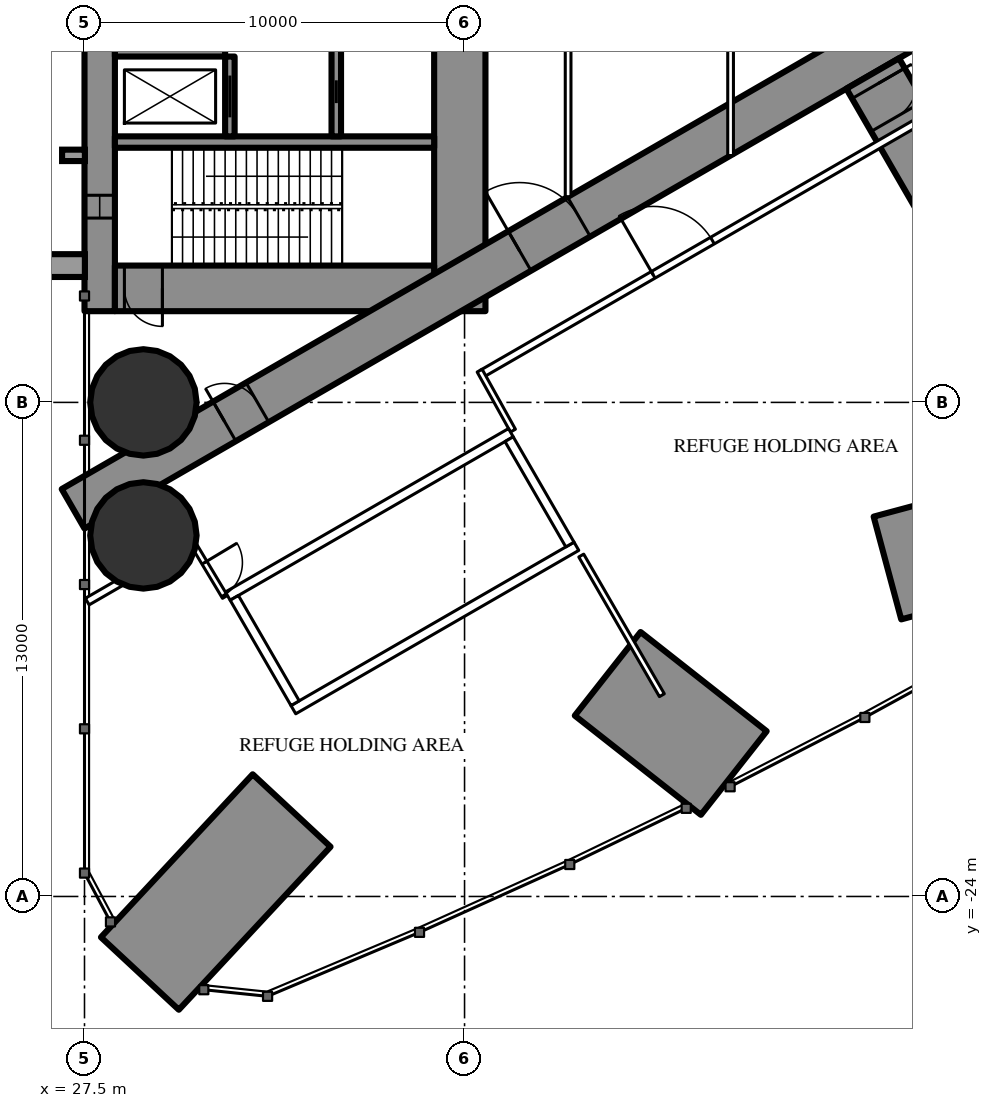
"""IFC4 building model, lengths in metres.
Left out: names, types, materials, properties, quantities, classifications, styles, units other than length and angle.
Written with IfcOpenShell. Run it as: python <this file> out.ifc"""

import sys

from ifc_helpers import new_model, si_unit, direction, frame, frame_2d, origin, origin_2d, place, context, subcontext, project, spatial, rectangle, hollow_circle, extrude, element, fill, save


model = new_model("IFC4")
c1 = context("Model", 3, precision=1e-05, world=origin(), true_north=direction((0.0, 1.0)))
c2 = subcontext(c1, "Body", "Model", "MODEL_VIEW")
j1 = project(units=[si_unit("LENGTHUNIT", "METRE"), si_unit("PLANEANGLEUNIT", "RADIAN")], contexts=[c1])
p1 = place(None, origin())
s1 = spatial("IfcSite", under=j1, at=p1, CompositionType="ELEMENT")
p2 = place(p1, origin())
s2 = spatial("IfcBuilding", under=s1, at=p2, CompositionType="ELEMENT")
p3 = place(p2, frame((0.0, 0.0, 81.0)))
s3 = spatial("IfcBuildingStorey", under=s2, at=p3, CompositionType="ELEMENT", Elevation=81.0)
p4 = place(p3, frame((28.957, -26.027, 0.0), z_axis=(0.0, 0.0, 1.0), x_axis=(0.681428532725, 0.731884659484, 0.0)))
e1 = element("IfcWall", 1, at=p4, inside=s3, PredefinedType="SHEAR", context=c2, shape_type="SweptSolid", body=[
    extrude(rectangle(XDim=5.86, YDim=2.8, at=frame_2d((2.93, 0.0))), origin(), (0.0, 0.0, 1.0), 6.0),
])
for number, where, z_axis, x_axis in (
    (2, (29.05, -11.0, 0.0), (0.0, 0.0, 1.0), (1.0, 0.0, 0.0)),
    (3, (29.05, -14.5, 0.0), (0.0, 0.0, 1.0), (1.0, 0.0, 0.0)),
):
    element("IfcColumn", number, at=place(p3, frame(where, z_axis=z_axis, x_axis=x_axis)), inside=s3, PredefinedType="COLUMN", context=c2, shape_type="SweptSolid", body=[
        extrude(hollow_circle(Radius=1.4, WallThickness=0.12, at=origin_2d()), origin(), (0.0, 0.0, 1.0), 6.0),
    ])
p5 = place(p3, frame((44.584, -20.752, 0.0), z_axis=(0.0, 0.0, 1.0), x_axis=(-0.785936955348, 0.618306640931, 0.0)))
e4 = element("IfcWall", 4, at=p5, inside=s3, PredefinedType="SHEAR", context=c2, shape_type="SweptSolid", body=[
    extrude(rectangle(XDim=4.222, YDim=2.8, at=frame_2d((2.111, 0.0))), origin(), (0.0, 0.0, 1.0), 6.0),
])
p6 = place(p3, frame((56.147, -13.337, 0.0), z_axis=(0.0, 0.0, 1.0), x_axis=(-0.965766047912, -0.259414611578, 0.0)))
e5 = element("IfcWall", 5, at=p6, inside=s3, PredefinedType="SHEAR", context=c2, shape_type="SweptSolid", body=[
    extrude(rectangle(XDim=7.787, YDim=2.8, at=frame_2d((3.894, 0.0))), origin(), (0.0, 0.0, 1.0), 6.0),
])
p7 = place(p3, frame((27.9, -8.6, 0.0), z_axis=(0.0, 0.0, 1.0), x_axis=(0.0, 1.0, 0.0)))
e6 = element("IfcWall", 6, at=p7, inside=s3, PredefinedType="SHEAR", context=c2, shape_type="SweptSolid", body=[
    extrude(rectangle(XDim=17.2, YDim=0.8, at=frame_2d((8.6, 0.0))), origin(), (0.0, 0.0, 1.0), 6.0),
])
p8 = place(p7, frame((2.45, 0.0, 0.6)))
e7 = element("IfcOpeningElement", 7, at=p8, cuts=e6, PredefinedType="OPENING", context=c2, shape_type="SweptSolid", body=[
    extrude(rectangle(XDim=0.6, YDim=4.5, at=frame_2d((0.3, 2.25))), frame((0.0, 0.41, 0.0), z_axis=(0.0, -1.0, 0.0), x_axis=(1.0, 0.0, 0.0)), (0.0, 0.0, 1.0), 0.82),
])
p9 = place(p7, frame((14.15, 0.0, 0.6)))
e8 = element("IfcOpeningElement", 8, at=p9, cuts=e6, PredefinedType="OPENING", context=c2, shape_type="SweptSolid", body=[
    extrude(rectangle(XDim=0.6, YDim=4.5, at=frame_2d((0.3, 2.25))), frame((0.0, 0.41, 0.0), z_axis=(0.0, -1.0, 0.0), x_axis=(1.0, 0.0, 0.0)), (0.0, 0.0, 1.0), 0.82),
])
p10 = place(p3, frame((37.375, -8.6, 0.0), z_axis=(0.0, 0.0, 1.0), x_axis=(0.0, 1.0, 0.0)))
e9 = element("IfcWall", 9, at=p10, inside=s3, PredefinedType="SHEAR", context=c2, shape_type="SweptSolid", body=[
    extrude(rectangle(XDim=17.2, YDim=1.35, at=frame_2d((8.6, 0.0))), origin(), (0.0, 0.0, 1.0), 6.0),
])
p11 = place(p10, frame((7.7, 0.0, 0.0)))
e10 = element("IfcOpeningElement", 10, at=p11, cuts=e9, PredefinedType="OPENING", context=c2, shape_type="SweptSolid", body=[
    extrude(rectangle(XDim=1.8, YDim=2.2, at=frame_2d((0.9, 1.1))), frame((0.0, 0.685, 0.0), z_axis=(0.0, -1.0, 0.0), x_axis=(1.0, 0.0, 0.0)), (0.0, 0.0, 1.0), 1.37),
])
p12 = place(p3, frame((28.3, -8.0, 0.0), z_axis=(0.0, 0.0, 1.0), x_axis=(1.0, 0.0, 0.0)))
e11 = element("IfcWall", 11, at=p12, inside=s3, PredefinedType="SHEAR", context=c2, shape_type="SweptSolid", body=[
    extrude(rectangle(XDim=8.4, YDim=1.2, at=frame_2d((4.2, 0.0))), origin(), (0.0, 0.0, 1.0), 6.0),
])
p13 = place(p12, frame((0.25, 0.0, 0.0)))
e12 = element("IfcOpeningElement", 12, at=p13, cuts=e11, PredefinedType="OPENING", context=c2, shape_type="SweptSolid", body=[
    extrude(rectangle(XDim=1.0, YDim=2.2, at=frame_2d((0.5, 1.1))), frame((0.0, 0.61, 0.0), z_axis=(0.0, -1.0, 0.0), x_axis=(1.0, 0.0, 0.0)), (0.0, 0.0, 1.0), 1.22),
])
p14 = place(p3, frame((28.3, -4.15, 0.0), z_axis=(0.0, 0.0, 1.0), x_axis=(1.0, 0.0, 0.0)))
e13 = element("IfcWall", 13, at=p14, inside=s3, PredefinedType="SHEAR", context=c2, shape_type="SweptSolid", body=[
    extrude(rectangle(XDim=8.4, YDim=0.3, at=frame_2d((4.2, 0.0))), origin(), (0.0, 0.0, 1.0), 6.0),
])
p15 = place(p3, frame((31.325, -4.0, 0.0), z_axis=(0.0, 0.0, 1.0), x_axis=(0.0, 1.0, 0.0)))
e14 = element("IfcWall", 14, at=p15, inside=s3, PredefinedType="SHEAR", context=c2, shape_type="SweptSolid", body=[
    extrude(rectangle(XDim=2.1, YDim=0.25, at=frame_2d((1.05, 0.0))), origin(), (0.0, 0.0, 1.0), 6.0),
])
p16 = place(p15, frame((0.5, 0.0, 0.0)))
e15 = element("IfcOpeningElement", 15, at=p16, cuts=e14, PredefinedType="OPENING", context=c2, shape_type="SweptSolid", body=[
    extrude(rectangle(XDim=1.1, YDim=2.2, at=frame_2d((0.55, 1.1))), frame((0.0, 0.135, 0.0), z_axis=(0.0, -1.0, 0.0), x_axis=(1.0, 0.0, 0.0)), (0.0, 0.0, 1.0), 0.27),
])
p17 = place(p3, frame((34.125, -4.0, 0.0), z_axis=(0.0, 0.0, 1.0), x_axis=(0.0, 1.0, 0.0)))
e16 = element("IfcWall", 16, at=p17, inside=s3, PredefinedType="SHEAR", context=c2, shape_type="SweptSolid", body=[
    extrude(rectangle(XDim=2.35, YDim=0.25, at=frame_2d((1.175, 0.0))), origin(), (0.0, 0.0, 1.0), 6.0),
])
p18 = place(p17, frame((0.875, 0.0, 0.0)))
e17 = element("IfcOpeningElement", 17, at=p18, cuts=e16, PredefinedType="OPENING", context=c2, shape_type="SweptSolid", body=[
    extrude(rectangle(XDim=0.6, YDim=2.0, at=frame_2d((0.3, 1.0))), frame((0.0, 0.135, 0.0), z_axis=(0.0, -1.0, 0.0), x_axis=(1.0, 0.0, 0.0)), (0.0, 0.0, 1.0), 0.27),
])
p19 = place(p3, frame((28.3, -1.775, 0.0), z_axis=(0.0, 0.0, 1.0), x_axis=(1.0, 0.0, 0.0)))
e18 = element("IfcWall", 18, at=p19, inside=s3, PredefinedType="SHEAR", context=c2, shape_type="SweptSolid", body=[
    extrude(rectangle(XDim=2.9, YDim=0.25, at=frame_2d((1.45, 0.0))), origin(), (0.0, 0.0, 1.0), 6.0),
])
p20 = place(p3, frame((27.2, -13.8, 0.0), z_axis=(0.0, 0.0, 1.0), x_axis=(0.866027159892, 0.499996958321, 0.0)))
e19 = element("IfcWall", 19, at=p20, inside=s3, PredefinedType="SHEAR", context=c2, shape_type="SweptSolid", body=[
    extrude(rectangle(XDim=27.947, YDim=1.2, at=frame_2d((13.973, 0.0))), origin(), (0.0, 0.0, 1.0), 6.0),
])
p21 = place(p20, frame((4.6, 0.0, 0.0)))
e20 = element("IfcOpeningElement", 20, at=p21, cuts=e19, PredefinedType="OPENING", context=c2, shape_type="SweptSolid", body=[
    extrude(rectangle(XDim=1.0, YDim=2.2, at=frame_2d((0.5, 1.1))), frame((0.0, 0.61, 0.0), z_axis=(0.0, -1.0, 0.0), x_axis=(1.0, 0.0, 0.0)), (0.0, 0.0, 1.0), 1.22),
])
p22 = place(p20, frame((13.568, 0.0, 0.0)))
e21 = element("IfcOpeningElement", 21, at=p22, cuts=e19, PredefinedType="OPENING", context=c2, shape_type="SweptSolid", body=[
    extrude(rectangle(XDim=1.8, YDim=2.2, at=frame_2d((0.9, 1.1))), frame((0.0, 0.61, 0.0), z_axis=(0.0, -1.0, 0.0), x_axis=(1.0, 0.0, 0.0)), (0.0, 0.0, 1.0), 1.22),
])
p23 = place(p3, frame((48.239, -2.346, 0.0), z_axis=(0.0, 0.0, 1.0), x_axis=(0.500006130383, -0.866021864377, 0.0)))
e22 = element("IfcWall", 22, at=p23, inside=s3, PredefinedType="SHEAR", context=c2, shape_type="SweptSolid", body=[
    extrude(rectangle(XDim=13.112, YDim=1.6, at=frame_2d((6.556, 0.0))), origin(), (0.0, 0.0, 1.0), 6.0),
])
p24 = place(p23, frame((0.3, 0.0, 0.0)))
e23 = element("IfcOpeningElement", 23, at=p24, cuts=e22, PredefinedType="OPENING", context=c2, shape_type="SweptSolid", body=[
    extrude(rectangle(XDim=1.0, YDim=2.2, at=frame_2d((0.5, 1.1))), frame((0.0, 0.81, 0.0), z_axis=(0.0, -1.0, 0.0), x_axis=(1.0, 0.0, 0.0)), (0.0, 0.0, 1.0), 1.62),
])
p25 = place(p3, frame((40.57, -15.03, 0.0), z_axis=(0.0, 0.0, 1.0), x_axis=(0.500012993597, -0.866017901798, 0.0)))
e24 = element("IfcWall", 24, at=p25, inside=s3, PredefinedType="PARTITIONING", context=c2, shape_type="SweptSolid", body=[
    extrude(rectangle(XDim=4.243, YDim=0.15, at=frame_2d((2.122, 0.0))), origin(), (0.0, 0.0, 1.0), 5.75),
])
p26 = place(p3, frame((27.572, -16.241, 0.0), z_axis=(0.0, 0.0, 1.0), x_axis=(0.866029654818, 0.499992636921, 0.0)))
e25 = element("IfcWall", 25, at=p26, inside=s3, PredefinedType="PARTITIONING", context=c2, shape_type="SweptSolid", body=[
    extrude(rectangle(XDim=3.155, YDim=0.2, at=frame_2d((1.577, 0.0))), origin(), (0.0, 0.0, 1.0), 5.75),
])
p27 = place(p3, frame((37.96, -10.243, 0.0), z_axis=(0.0, 0.0, 1.0), x_axis=(0.866026429433, 0.499998223521, 0.0)))
e26 = element("IfcWall", 26, at=p27, inside=s3, PredefinedType="PARTITIONING", context=c2, shape_type="SweptSolid", body=[
    extrude(rectangle(XDim=20.487, YDim=0.2, at=frame_2d((10.243, 0.0))), origin(), (0.0, 0.0, 1.0), 5.75),
])
p28 = place(p27, frame((14.943, 0.0, 0.0)))
e27 = element("IfcOpeningElement", 27, at=p28, cuts=e26, PredefinedType="OPENING", context=c2, shape_type="SweptSolid", body=[
    extrude(rectangle(XDim=1.8, YDim=2.2, at=frame_2d((0.9, 1.1))), frame((0.0, 0.11, 0.0), z_axis=(0.0, -1.0, 0.0), x_axis=(1.0, 0.0, 0.0)), (0.0, 0.0, 1.0), 0.22),
])
p29 = place(p27, frame((5.2, 0.0, 0.0)))
e28 = element("IfcOpeningElement", 28, at=p29, cuts=e26, PredefinedType="OPENING", context=c2, shape_type="SweptSolid", body=[
    extrude(rectangle(XDim=1.8, YDim=2.2, at=frame_2d((0.9, 1.1))), frame((0.0, 0.11, 0.0), z_axis=(0.0, -1.0, 0.0), x_axis=(1.0, 0.0, 0.0)), (0.0, 0.0, 1.0), 0.22),
])
p30 = place(p3, frame((30.267, -14.569, 0.0), z_axis=(0.0, 0.0, 1.0), x_axis=(0.514336634837, -0.857588377991, 0.0)))
e29 = element("IfcWall", 29, at=p30, inside=s3, PredefinedType="PARTITIONING", context=c2, shape_type="SweptSolid", body=[
    extrude(rectangle(XDim=1.805, YDim=0.15, at=frame_2d((0.903, 0.0))), origin(), (0.0, 0.0, 1.0), 2.75),
])
p31 = place(p30, frame((0.755, 0.0, 0.0)))
e30 = element("IfcOpeningElement", 30, at=p31, cuts=e29, PredefinedType="OPENING", context=c2, shape_type="SweptSolid", body=[
    extrude(rectangle(XDim=1.0, YDim=2.2, at=frame_2d((0.5, 1.1))), frame((0.0, 0.085, 0.0), z_axis=(0.0, -1.0, 0.0), x_axis=(1.0, 0.0, 0.0)), (0.0, 0.0, 1.0), 0.17),
])
p32 = place(p3, frame((38.773, -11.742, 0.0), z_axis=(0.0, 0.0, 1.0), x_axis=(-0.485528096672, 0.8742210632, 0.0)))
e31 = element("IfcWall", 31, at=p32, inside=s3, PredefinedType="PARTITIONING", context=c2, shape_type="SweptSolid", body=[
    extrude(rectangle(XDim=1.805, YDim=0.15, at=frame_2d((0.903, 0.0))), origin(), (0.0, 0.0, 1.0), 5.75),
])
p33 = place(p3, frame((40.225, -5.587, 0.0), z_axis=(0.0, 0.0, 1.0), x_axis=(0.0, 1.0, 0.0)))
e32 = element("IfcWall", 32, at=p33, inside=s3, PredefinedType="PARTITIONING", context=c2, shape_type="SweptSolid", body=[
    extrude(rectangle(XDim=11.174, YDim=0.15, at=frame_2d((5.587, 0.0))), origin(), (0.0, 0.0, 1.0), 5.75),
])
p34 = place(p33, frame((4.687, 0.0, 0.0)))
e33 = element("IfcOpeningElement", 33, at=p34, cuts=e32, PredefinedType="OPENING", context=c2, shape_type="SweptSolid", body=[
    extrude(rectangle(XDim=1.8, YDim=2.2, at=frame_2d((0.9, 1.1))), frame((0.0, 0.085, 0.0), z_axis=(0.0, -1.0, 0.0), x_axis=(1.0, 0.0, 0.0)), (0.0, 0.0, 1.0), 0.17),
])
p35 = place(p3, frame((44.5, -4.505, 0.0), z_axis=(0.0, 0.0, 1.0), x_axis=(0.0, 1.0, 0.0)))
e34 = element("IfcWall", 34, at=p35, inside=s3, PredefinedType="PARTITIONING", context=c2, shape_type="SweptSolid", body=[
    extrude(rectangle(XDim=9.009, YDim=0.15, at=frame_2d((4.505, 0.0))), origin(), (0.0, 0.0, 1.0), 5.75),
])
p36 = place(p35, frame((4.005, 0.0, 0.0)))
e35 = element("IfcOpeningElement", 35, at=p36, cuts=e34, PredefinedType="OPENING", context=c2, shape_type="SweptSolid", body=[
    extrude(rectangle(XDim=1.0, YDim=2.2, at=frame_2d((0.5, 1.1))), frame((0.0, 0.085, 0.0), z_axis=(0.0, -1.0, 0.0), x_axis=(1.0, 0.0, 0.0)), (0.0, 0.0, 1.0), 0.17),
])
for number, where, z_axis, x_axis in (
    (36, (31.271, -16.097, 0.0), (0.0, 0.0, 1.0), (0.866, 0.5, 0.0)),
    (37, (32.996, -19.086, 0.0), (0.0, 0.0, 1.0), (0.866, 0.5, 0.0)),
):
    element("IfcWall", number, at=place(p3, frame(where, z_axis=z_axis, x_axis=x_axis)), inside=s3, PredefinedType="PARTITIONING", context=c2, shape_type="SweptSolid", body=[
        extrude(rectangle(XDim=8.6, YDim=0.25, at=frame_2d((4.3, 0.0))), origin(), (0.0, 0.0, 1.0), 5.75),
    ])
for number, where, z_axis, x_axis in (
    (38, (31.441, -16.143, 0.0), (0.0, 0.0, 1.0), (0.5, -0.866, 0.0)),
    (39, (38.673, -11.968, 0.0), (0.0, 0.0, 1.0), (0.5, -0.866, 0.0)),
):
    element("IfcWall", number, at=place(p3, frame(where, z_axis=z_axis, x_axis=x_axis)), inside=s3, PredefinedType="PARTITIONING", context=c2, shape_type="SweptSolid", body=[
        extrude(rectangle(XDim=3.201, YDim=0.25, at=frame_2d((1.6, 0.0))), origin(), (0.0, 0.0, 1.0), 5.75),
    ])
p37 = place(p24, origin())
e40 = element("IfcDoor", 40, at=p37, inside=s3, OperationType="SINGLE_SWING_LEFT", PredefinedType="DOOR", context=c2, shape_type="SweptSolid", body=[
    extrude(rectangle(XDim=1.0, YDim=2.2, at=frame_2d((0.5, 1.1))), frame((0.0, 0.025, 0.0), z_axis=(0.0, -1.0, 0.0), x_axis=(1.0, 0.0, 0.0)), (0.0, 0.0, 1.0), 0.05),
])
fill(e23, e40)
p38 = place(p31, origin())
e41 = element("IfcDoor", 41, at=p38, inside=s3, OperationType="SINGLE_SWING_LEFT", PredefinedType="DOOR", context=c2, shape_type="SweptSolid", body=[
    extrude(rectangle(XDim=1.0, YDim=2.2, at=frame_2d((0.5, 1.1))), frame((0.0, 0.025, 0.0), z_axis=(0.0, -1.0, 0.0), x_axis=(1.0, 0.0, 0.0)), (0.0, 0.0, 1.0), 0.05),
])
fill(e30, e41)
p39 = place(p29, origin())
e42 = element("IfcDoor", 42, at=p39, inside=s3, OperationType="DOUBLE_DOOR_SINGLE_SWING", PredefinedType="DOOR", context=c2, shape_type="SweptSolid", body=[
    extrude(rectangle(XDim=1.8, YDim=2.2, at=frame_2d((0.9, 1.1))), frame((0.0, 0.025, 0.0), z_axis=(0.0, -1.0, 0.0), x_axis=(1.0, 0.0, 0.0)), (0.0, 0.0, 1.0), 0.05),
])
fill(e28, e42)
p40 = place(p21, origin())
e43 = element("IfcDoor", 43, at=p40, inside=s3, OperationType="SINGLE_SWING_LEFT", PredefinedType="DOOR", context=c2, shape_type="SweptSolid", body=[
    extrude(rectangle(XDim=1.0, YDim=2.2, at=frame_2d((0.5, 1.1))), frame((0.0, 0.025, 0.0), z_axis=(0.0, -1.0, 0.0), x_axis=(1.0, 0.0, 0.0)), (0.0, 0.0, 1.0), 0.05),
])
fill(e20, e43)
p41 = place(p22, origin())
e44 = element("IfcDoor", 44, at=p41, inside=s3, OperationType="DOUBLE_DOOR_SINGLE_SWING", PredefinedType="DOOR", context=c2, shape_type="SweptSolid", body=[
    extrude(rectangle(XDim=1.8, YDim=2.2, at=frame_2d((0.9, 1.1))), frame((0.0, 0.025, 0.0), z_axis=(0.0, -1.0, 0.0), x_axis=(1.0, 0.0, 0.0)), (0.0, 0.0, 1.0), 0.05),
])
fill(e21, e44)
p42 = place(p13, origin())
e45 = element("IfcDoor", 45, at=p42, inside=s3, OperationType="SINGLE_SWING_RIGHT", PredefinedType="DOOR", context=c2, shape_type="SweptSolid", body=[
    extrude(rectangle(XDim=1.0, YDim=2.2, at=frame_2d((0.5, 1.1))), frame((0.0, 0.025, 0.0), z_axis=(0.0, -1.0, 0.0), x_axis=(1.0, 0.0, 0.0)), (0.0, 0.0, 1.0), 0.05),
])
fill(e12, e45)
p43 = place(p16, origin())
e46 = element("IfcDoor", 46, at=p43, inside=s3, OperationType="SLIDING_TO_LEFT", PredefinedType="USERDEFINED", context=c2, shape_type="SweptSolid", body=[
    extrude(rectangle(XDim=1.1, YDim=2.2, at=frame_2d((0.55, 1.1))), frame((0.0, 0.025, 0.0), z_axis=(0.0, -1.0, 0.0), x_axis=(1.0, 0.0, 0.0)), (0.0, 0.0, 1.0), 0.05),
])
fill(e15, e46)
p44 = place(p18, origin())
e47 = element("IfcDoor", 47, at=p44, inside=s3, OperationType="SLIDING_TO_LEFT", PredefinedType="DOOR", context=c2, shape_type="SweptSolid", body=[
    extrude(rectangle(XDim=0.6, YDim=2.0, at=frame_2d((0.3, 1.0))), frame((0.0, 0.025, 0.0), z_axis=(0.0, -1.0, 0.0), x_axis=(1.0, 0.0, 0.0)), (0.0, 0.0, 1.0), 0.05),
])
fill(e17, e47)
p45 = place(p8, origin())
e48 = element("IfcWindow", 48, at=p45, inside=s3, PartitioningType="SINGLE_PANEL", PredefinedType="WINDOW", context=c2, shape_type="SweptSolid", body=[
    extrude(rectangle(XDim=0.6, YDim=4.5, at=frame_2d((0.3, 2.25))), frame((0.0, 0.03, 0.0), z_axis=(0.0, -1.0, 0.0), x_axis=(1.0, 0.0, 0.0)), (0.0, 0.0, 1.0), 0.06),
])
fill(e7, e48)
save(model, sys.argv[1])
